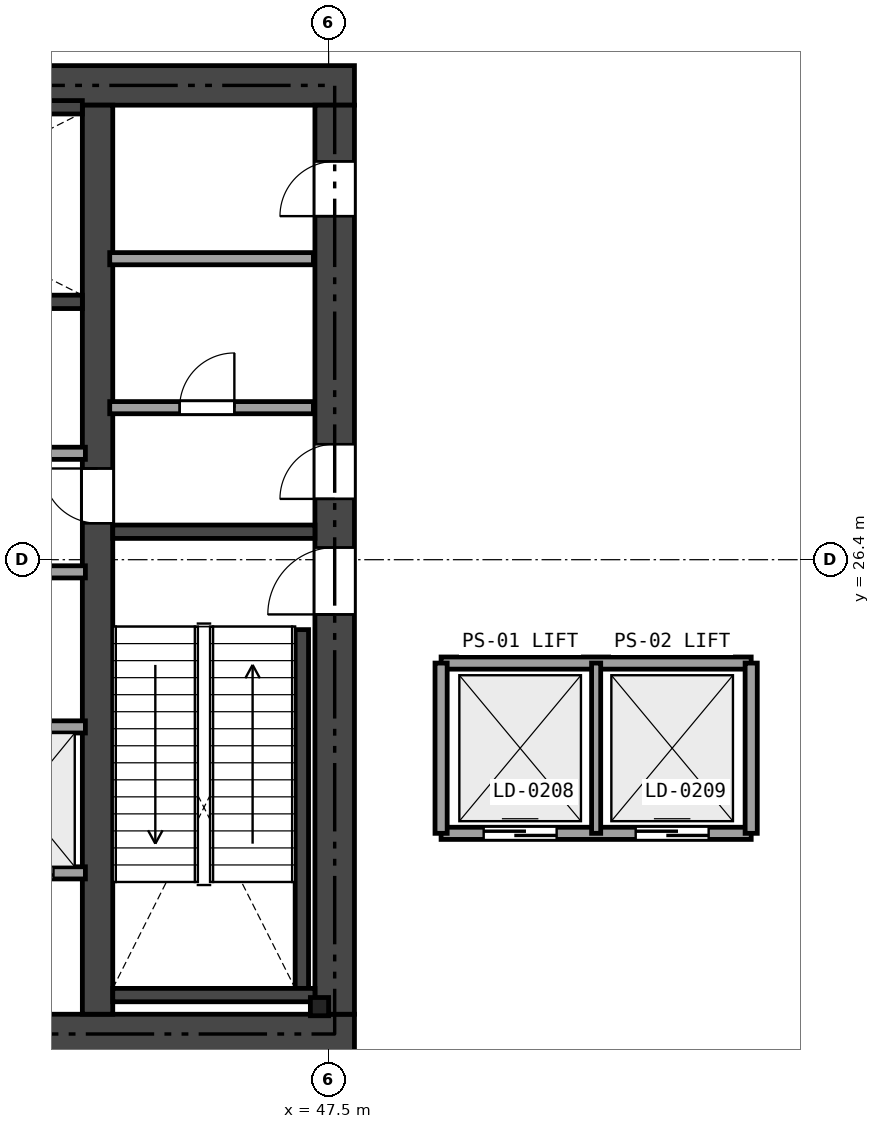
"""IFC4 building model, lengths in metres.
Left out: names, types, materials, properties, quantities, classifications, styles, units other than length and angle.
Written with IfcOpenShell. Run it as: python <this file> out.ifc"""

import sys

from ifc_helpers import new_model, si_unit, direction, frame, frame_2d, origin, origin_2d, place, context, subcontext, project, spatial, rectangle, i_section, extrude, element, fill, save


model = new_model("IFC4")
c1 = context("Model", 3, precision=1e-05, world=origin(), true_north=direction((0.0, 1.0)))
c2 = subcontext(c1, "Body", "Model", "MODEL_VIEW")
j1 = project(units=[si_unit("LENGTHUNIT", "METRE"), si_unit("PLANEANGLEUNIT", "RADIAN")], contexts=[c1])
p1 = place(None, origin())
s1 = spatial("IfcSite", under=j1, at=p1, CompositionType="ELEMENT")
p2 = place(p1, origin())
s2 = spatial("IfcBuilding", under=s1, at=p2, CompositionType="ELEMENT")
p3 = place(p2, frame((0.0, 0.0, 10.8)))
s3 = spatial("IfcBuildingStorey", under=s2, at=p3, CompositionType="ELEMENT", Elevation=10.8)
p4 = place(p3, frame((26.475, 18.6, 0.0), z_axis=(0.0, 0.0, 1.0), x_axis=(1.0, 0.0, 0.0)))
e1 = element("IfcWall", 1, at=p4, inside=s3, PredefinedType="SHEAR", context=c2, shape_type="SweptSolid", body=[
    extrude(rectangle(XDim=21.45, YDim=0.65, at=frame_2d((10.725, 0.0))), origin(), (0.0, 0.0, 1.0), 5.05),
])
p5 = place(p4, frame((12.45, 0.0, 0.0)))
e2 = element("IfcOpeningElement", 2, at=p5, cuts=e1, PredefinedType="OPENING", context=c2, shape_type="SweptSolid", body=[
    extrude(rectangle(XDim=1.15, YDim=2.15, at=frame_2d((0.575, 1.075))), frame((0.0, 0.335, 0.0), z_axis=(0.0, -1.0, 0.0), x_axis=(1.0, 0.0, 0.0)), (0.0, 0.0, 1.0), 0.67),
])
p6 = place(p4, frame((5.275, 0.0, 0.0)))
e3 = element("IfcOpeningElement", 3, at=p6, cuts=e1, PredefinedType="OPENING", context=c2, shape_type="SweptSolid", body=[
    extrude(rectangle(XDim=0.9, YDim=2.1, at=frame_2d((0.45, 1.05))), frame((0.0, 0.335, 0.0), z_axis=(0.0, -1.0, 0.0), x_axis=(1.0, 0.0, 0.0)), (0.0, 0.0, 1.0), 0.67),
])
p7 = place(p3, frame((26.475, 34.2, 0.0), z_axis=(0.0, 0.0, 1.0), x_axis=(1.0, 0.0, 0.0)))
e4 = element("IfcWall", 4, at=p7, inside=s3, PredefinedType="SHEAR", context=c2, shape_type="SweptSolid", body=[
    extrude(rectangle(XDim=21.45, YDim=0.65, at=frame_2d((10.725, 0.0))), origin(), (0.0, 0.0, 1.0), 5.05),
])
p8 = place(p7, frame((9.725, 0.0, 0.0)))
e5 = element("IfcOpeningElement", 5, at=p8, cuts=e4, PredefinedType="OPENING", context=c2, shape_type="SweptSolid", body=[
    extrude(rectangle(XDim=1.1, YDim=2.15, at=frame_2d((0.55, 1.075))), frame((0.0, 0.335, 0.0), z_axis=(0.0, -1.0, 0.0), x_axis=(1.0, 0.0, 0.0)), (0.0, 0.0, 1.0), 0.67),
])
p9 = place(p7, frame((1.975, 0.0, 0.0)))
e6 = element("IfcOpeningElement", 6, at=p9, cuts=e4, PredefinedType="OPENING", context=c2, shape_type="SweptSolid", body=[
    extrude(rectangle(XDim=0.9, YDim=2.1, at=frame_2d((0.45, 1.05))), frame((0.0, 0.335, 0.0), z_axis=(0.0, -1.0, 0.0), x_axis=(1.0, 0.0, 0.0)), (0.0, 0.0, 1.0), 0.67),
])
p10 = place(p7, frame((6.275, 0.0, 0.0)))
e7 = element("IfcOpeningElement", 7, at=p10, cuts=e4, PredefinedType="OPENING", context=c2, shape_type="SweptSolid", body=[
    extrude(rectangle(XDim=0.9, YDim=2.1, at=frame_2d((0.45, 1.05))), frame((0.0, 0.335, 0.0), z_axis=(0.0, -1.0, 0.0), x_axis=(1.0, 0.0, 0.0)), (0.0, 0.0, 1.0), 0.67),
])
p11 = place(p3, frame((47.6, 18.925, 0.0), z_axis=(0.0, 0.0, 1.0), x_axis=(0.0, 1.0, 0.0)))
e8 = element("IfcWall", 8, at=p11, inside=s3, PredefinedType="SHEAR", context=c2, shape_type="SweptSolid", body=[
    extrude(rectangle(XDim=14.95, YDim=0.65, at=frame_2d((7.475, 0.0))), origin(), (0.0, 0.0, 1.0), 5.05),
])
p12 = place(p11, frame((6.575, 0.0, 0.0)))
e9 = element("IfcOpeningElement", 9, at=p12, cuts=e8, PredefinedType="OPENING", context=c2, shape_type="SweptSolid", body=[
    extrude(rectangle(XDim=1.1, YDim=2.15, at=frame_2d((0.55, 1.075))), frame((0.0, 0.335, 0.0), z_axis=(0.0, -1.0, 0.0), x_axis=(1.0, 0.0, 0.0)), (0.0, 0.0, 1.0), 0.67),
])
p13 = place(p11, frame((8.475, 0.0, 0.0)))
e10 = element("IfcOpeningElement", 10, at=p13, cuts=e8, PredefinedType="OPENING", context=c2, shape_type="SweptSolid", body=[
    extrude(rectangle(XDim=0.9, YDim=2.1, at=frame_2d((0.45, 1.05))), frame((0.0, 0.335, 0.0), z_axis=(0.0, -1.0, 0.0), x_axis=(1.0, 0.0, 0.0)), (0.0, 0.0, 1.0), 0.67),
])
p14 = place(p11, frame((13.125, 0.0, 0.0)))
e11 = element("IfcOpeningElement", 11, at=p14, cuts=e8, PredefinedType="OPENING", context=c2, shape_type="SweptSolid", body=[
    extrude(rectangle(XDim=0.9, YDim=2.1, at=frame_2d((0.45, 1.05))), frame((0.0, 0.335, 0.0), z_axis=(0.0, -1.0, 0.0), x_axis=(1.0, 0.0, 0.0)), (0.0, 0.0, 1.0), 0.67),
])
p15 = place(p3, frame((43.7, 18.925, 0.0), z_axis=(0.0, 0.0, 1.0), x_axis=(0.0, 1.0, 0.0)))
e12 = element("IfcWall", 12, at=p15, inside=s3, PredefinedType="SHEAR", context=c2, shape_type="SweptSolid", body=[
    extrude(rectangle(XDim=14.95, YDim=0.5, at=frame_2d((7.475, 0.0))), origin(), (0.0, 0.0, 1.0), 5.05),
])
p16 = place(p15, frame((8.075, 0.0, 0.0)))
e13 = element("IfcOpeningElement", 13, at=p16, cuts=e12, PredefinedType="OPENING", context=c2, shape_type="SweptSolid", body=[
    extrude(rectangle(XDim=0.9, YDim=2.1, at=frame_2d((0.45, 1.05))), frame((0.0, 0.26, 0.0), z_axis=(0.0, -1.0, 0.0), x_axis=(1.0, 0.0, 0.0)), (0.0, 0.0, 1.0), 0.52),
])
p17 = place(p3, frame((43.95, 26.86, 0.0), z_axis=(0.0, 0.0, 1.0), x_axis=(1.0, 0.0, 0.0)))
e14 = element("IfcWall", 14, at=p17, inside=s3, PredefinedType="SHEAR", context=c2, shape_type="SweptSolid", body=[
    extrude(rectangle(XDim=3.325, YDim=0.22, at=frame_2d((1.663, 0.0))), origin(), (0.0, 0.0, 1.0), 5.05),
])
p18 = place(p3, frame((47.06, 19.35, 0.0), z_axis=(0.0, 0.0, 1.0), x_axis=(0.0, 1.0, 0.0)))
e15 = element("IfcWall", 15, at=p18, inside=s3, PredefinedType="SHEAR", context=c2, shape_type="SweptSolid", body=[
    extrude(rectangle(XDim=5.9, YDim=0.22, at=frame_2d((2.95, 0.0))), origin(), (0.0, 0.0, 1.0), 5.05),
])
p19 = place(p3, frame((43.95, 19.24, 0.0), z_axis=(0.0, 0.0, 1.0), x_axis=(1.0, 0.0, 0.0)))
e16 = element("IfcWall", 16, at=p19, inside=s3, PredefinedType="SHEAR", context=c2, shape_type="SweptSolid", body=[
    extrude(rectangle(XDim=3.325, YDim=0.22, at=frame_2d((1.663, 0.0))), origin(), (0.0, 0.0, 1.0), 5.05),
])
p20 = place(p3, frame((35.84, 30.64, 0.0), z_axis=(0.0, 0.0, 1.0), x_axis=(1.0, 0.0, 0.0)))
e17 = element("IfcWall", 17, at=p20, inside=s3, PredefinedType="SHEAR", context=c2, shape_type="SweptSolid", body=[
    extrude(rectangle(XDim=7.61, YDim=0.22, at=frame_2d((3.805, 0.0))), origin(), (0.0, 0.0, 1.0), 5.05),
])
p21 = place(p3, frame((37.55, 33.84, 0.0), z_axis=(0.0, 0.0, 1.0), x_axis=(1.0, 0.0, 0.0)))
e18 = element("IfcWall", 18, at=p21, inside=s3, PredefinedType="SHEAR", context=c2, shape_type="SweptSolid", body=[
    extrude(rectangle(XDim=5.9, YDim=0.22, at=frame_2d((2.95, 0.0))), origin(), (0.0, 0.0, 1.0), 5.05),
])
p22 = place(p3, frame((47.35, 19.05, 0.0), z_axis=(0.0, 0.0, 1.0), x_axis=(1.0, 0.0, 0.0)))
e19 = element("IfcColumn", 19, at=p22, inside=s3, PredefinedType="PILASTER", context=c2, shape_type="SweptSolid", body=[
    extrude(i_section(OverallWidth=0.3, OverallDepth=0.3, WebThickness=0.011, FlangeThickness=0.019, at=origin_2d()), origin(), (0.0, 0.0, 1.0), 5.05),
])
p23 = place(p3, frame((43.9, 28.9, 0.0), z_axis=(0.0, 0.0, 1.0), x_axis=(1.0, 0.0, 0.0)))
e20 = element("IfcWall", 20, at=p23, inside=s3, PredefinedType="SOLIDWALL", context=c2, shape_type="SweptSolid", body=[
    extrude(rectangle(XDim=3.35, YDim=0.2, at=frame_2d((1.675, 0.0))), origin(), (0.0, 0.0, 1.0), 5.05),
])
p24 = place(p23, frame((1.15, 0.0, 0.0)))
e21 = element("IfcOpeningElement", 21, at=p24, cuts=e20, PredefinedType="OPENING", context=c2, shape_type="SweptSolid", body=[
    extrude(rectangle(XDim=0.9, YDim=2.1, at=frame_2d((0.45, 1.05))), frame((0.0, 0.11, 0.0), z_axis=(0.0, -1.0, 0.0), x_axis=(1.0, 0.0, 0.0)), (0.0, 0.0, 1.0), 0.22),
])
p25 = place(p3, frame((43.9, 31.35, 0.0), z_axis=(0.0, 0.0, 1.0), x_axis=(1.0, 0.0, 0.0)))
e22 = element("IfcWall", 22, at=p25, inside=s3, PredefinedType="SOLIDWALL", context=c2, shape_type="SweptSolid", body=[
    extrude(rectangle(XDim=3.35, YDim=0.2, at=frame_2d((1.675, 0.0))), origin(), (0.0, 0.0, 1.0), 5.05),
])
for number, where, z_axis, x_axis in (
    (23, (35.62, 28.15, 0.0), (0.0, 0.0, 1.0), (1.0, 0.0, 0.0)),
    (24, (35.62, 26.2, 0.0), (0.0, 0.0, 1.0), (1.0, 0.0, 0.0)),
):
    element("IfcWall", number, at=place(p3, frame(where, z_axis=z_axis, x_axis=x_axis)), inside=s3, PredefinedType="SOLIDWALL", context=c2, shape_type="SweptSolid", body=[
        extrude(rectangle(XDim=7.88, YDim=0.2, at=frame_2d((3.94, 0.0))), origin(), (0.0, 0.0, 1.0), 5.05),
    ])
p26 = place(p3, frame((35.62, 23.65, 0.0), z_axis=(0.0, 0.0, 1.0), x_axis=(1.0, 0.0, 0.0)))
e25 = element("IfcWall", 25, at=p26, inside=s3, PredefinedType="SOLIDWALL", context=c2, shape_type="SweptSolid", body=[
    extrude(rectangle(XDim=7.88, YDim=0.2, at=frame_2d((3.94, 0.0))), origin(), (0.0, 0.0, 1.0), 4.571),
])
p27 = place(p3, frame((35.62, 21.25, 0.0), z_axis=(0.0, 0.0, 1.0), x_axis=(1.0, 0.0, 0.0)))
e26 = element("IfcWall", 26, at=p27, inside=s3, PredefinedType="SOLIDWALL", context=c2, shape_type="SweptSolid", body=[
    extrude(rectangle(XDim=7.88, YDim=0.2, at=frame_2d((3.94, 0.0))), origin(), (0.0, 0.0, 1.0), 5.05),
])
p28 = place(p27, frame((0.405, 0.0, 0.0)))
e27 = element("IfcOpeningElement", 27, at=p28, cuts=e26, PredefinedType="OPENING", context=c2, shape_type="SweptSolid", body=[
    extrude(rectangle(XDim=1.1, YDim=2.15, at=frame_2d((0.55, 1.075))), frame((0.0, 0.11, 0.0), z_axis=(0.0, -1.0, 0.0), x_axis=(1.0, 0.0, 0.0)), (0.0, 0.0, 1.0), 0.22),
])
p29 = place(p27, frame((2.355, 0.0, 0.0)))
e28 = element("IfcOpeningElement", 28, at=p29, cuts=e26, PredefinedType="OPENING", context=c2, shape_type="SweptSolid", body=[
    extrude(rectangle(XDim=1.1, YDim=2.15, at=frame_2d((0.55, 1.075))), frame((0.0, 0.11, 0.0), z_axis=(0.0, -1.0, 0.0), x_axis=(1.0, 0.0, 0.0)), (0.0, 0.0, 1.0), 0.22),
])
p30 = place(p27, frame((4.305, 0.0, 0.0)))
e29 = element("IfcOpeningElement", 29, at=p30, cuts=e26, PredefinedType="OPENING", context=c2, shape_type="SweptSolid", body=[
    extrude(rectangle(XDim=1.1, YDim=2.15, at=frame_2d((0.55, 1.075))), frame((0.0, 0.11, 0.0), z_axis=(0.0, -1.0, 0.0), x_axis=(1.0, 0.0, 0.0)), (0.0, 0.0, 1.0), 0.22),
])
p31 = place(p27, frame((6.255, 0.0, 0.0)))
e30 = element("IfcOpeningElement", 30, at=p31, cuts=e26, PredefinedType="OPENING", context=c2, shape_type="SweptSolid", body=[
    extrude(rectangle(XDim=1.1, YDim=2.15, at=frame_2d((0.55, 1.075))), frame((0.0, 0.11, 0.0), z_axis=(0.0, -1.0, 0.0), x_axis=(1.0, 0.0, 0.0)), (0.0, 0.0, 1.0), 0.22),
])
p32 = place(p3, frame((49.35, 24.7, 0.0), z_axis=(0.0, 0.0, 1.0), x_axis=(1.0, 0.0, 0.0)))
e31 = element("IfcWall", 31, at=p32, inside=s3, PredefinedType="SOLIDWALL", context=c2, shape_type="SweptSolid", body=[
    extrude(rectangle(XDim=5.1, YDim=0.2, at=frame_2d((2.55, 0.0))), origin(), (0.0, 0.0, 1.0), 5.05),
])
p33 = place(p3, frame((49.35, 21.9, 0.0), z_axis=(0.0, 0.0, 1.0), x_axis=(1.0, 0.0, 0.0)))
e32 = element("IfcWall", 32, at=p33, inside=s3, PredefinedType="SOLIDWALL", context=c2, shape_type="SweptSolid", body=[
    extrude(rectangle(XDim=5.1, YDim=0.2, at=frame_2d((2.55, 0.0))), origin(), (0.0, 0.0, 1.0), 5.05),
])
p34 = place(p33, frame((0.7, 0.0, 0.0)))
e33 = element("IfcOpeningElement", 33, at=p34, cuts=e32, PredefinedType="OPENING", context=c2, shape_type="SweptSolid", body=[
    extrude(rectangle(XDim=1.2, YDim=2.15, at=frame_2d((0.6, 1.075))), frame((0.0, 0.11, 0.0), z_axis=(0.0, -1.0, 0.0), x_axis=(1.0, 0.0, 0.0)), (0.0, 0.0, 1.0), 0.22),
])
p35 = place(p33, frame((3.2, 0.0, 0.0)))
e34 = element("IfcOpeningElement", 34, at=p35, cuts=e32, PredefinedType="OPENING", context=c2, shape_type="SweptSolid", body=[
    extrude(rectangle(XDim=1.2, YDim=2.15, at=frame_2d((0.6, 1.075))), frame((0.0, 0.11, 0.0), z_axis=(0.0, -1.0, 0.0), x_axis=(1.0, 0.0, 0.0)), (0.0, 0.0, 1.0), 0.22),
])
for number, where, z_axis, x_axis in (
    (35, (49.35, 21.9, 0.0), (0.0, 0.0, 1.0), (0.0, 1.0, 0.0)),
    (36, (54.45, 21.9, 0.0), (0.0, 0.0, 1.0), (0.0, 1.0, 0.0)),
):
    element("IfcWall", number, at=place(p3, frame(where, z_axis=z_axis, x_axis=x_axis)), inside=s3, PredefinedType="SOLIDWALL", context=c2, shape_type="SweptSolid", body=[
        extrude(rectangle(XDim=2.8, YDim=0.2, at=frame_2d((1.4, 0.0))), origin(), (0.0, 0.0, 1.0), 5.05),
    ])
p36 = place(p3, frame((51.9, 21.9, 0.0), z_axis=(0.0, 0.0, 1.0), x_axis=(0.0, 1.0, 0.0)))
e37 = element("IfcWall", 37, at=p36, inside=s3, PredefinedType="PARTITIONING", context=c2, shape_type="SweptSolid", body=[
    extrude(rectangle(XDim=2.8, YDim=0.15, at=frame_2d((1.4, 0.0))), origin(), (0.0, 0.0, 1.0), 5.05),
])
p37 = place(p12, origin())
e38 = element("IfcDoor", 38, at=p37, inside=s3, OperationType="SINGLE_SWING_LEFT", PredefinedType="DOOR", context=c2, shape_type="SweptSolid", body=[
    extrude(rectangle(XDim=1.1, YDim=2.15, at=frame_2d((0.55, 1.075))), frame((0.0, 0.025, 0.0), z_axis=(0.0, -1.0, 0.0), x_axis=(1.0, 0.0, 0.0)), (0.0, 0.0, 1.0), 0.05),
])
fill(e9, e38)
p38 = place(p16, origin())
e39 = element("IfcDoor", 39, at=p38, inside=s3, OperationType="SINGLE_SWING_RIGHT", PredefinedType="DOOR", context=c2, shape_type="SweptSolid", body=[
    extrude(rectangle(XDim=0.9, YDim=2.1, at=frame_2d((0.45, 1.05))), frame((0.0, 0.025, 0.0), z_axis=(0.0, -1.0, 0.0), x_axis=(1.0, 0.0, 0.0)), (0.0, 0.0, 1.0), 0.05),
])
fill(e13, e39)
p39 = place(p13, origin())
e40 = element("IfcDoor", 40, at=p39, inside=s3, OperationType="SINGLE_SWING_LEFT", PredefinedType="DOOR", context=c2, shape_type="SweptSolid", body=[
    extrude(rectangle(XDim=0.9, YDim=2.1, at=frame_2d((0.45, 1.05))), frame((0.0, 0.025, 0.0), z_axis=(0.0, -1.0, 0.0), x_axis=(1.0, 0.0, 0.0)), (0.0, 0.0, 1.0), 0.05),
])
fill(e10, e40)
p40 = place(p24, origin())
e41 = element("IfcDoor", 41, at=p40, inside=s3, OperationType="SINGLE_SWING_RIGHT", PredefinedType="DOOR", context=c2, shape_type="SweptSolid", body=[
    extrude(rectangle(XDim=0.9, YDim=2.1, at=frame_2d((0.45, 1.05))), frame((0.0, 0.025, 0.0), z_axis=(0.0, -1.0, 0.0), x_axis=(1.0, 0.0, 0.0)), (0.0, 0.0, 1.0), 0.05),
])
fill(e21, e41)
p41 = place(p14, origin())
e42 = element("IfcDoor", 42, at=p41, inside=s3, OperationType="SINGLE_SWING_LEFT", PredefinedType="DOOR", context=c2, shape_type="SweptSolid", body=[
    extrude(rectangle(XDim=0.9, YDim=2.1, at=frame_2d((0.45, 1.05))), frame((0.0, 0.025, 0.0), z_axis=(0.0, -1.0, 0.0), x_axis=(1.0, 0.0, 0.0)), (0.0, 0.0, 1.0), 0.05),
])
fill(e11, e42)
p42 = place(p31, origin())
e43 = element("IfcDoor", 43, at=p42, inside=s3, OperationType="SLIDING_TO_LEFT", PredefinedType="DOOR", context=c2, shape_type="SweptSolid", body=[
    extrude(rectangle(XDim=1.1, YDim=2.15, at=frame_2d((0.55, 1.075))), frame((0.0, 0.025, 0.0), z_axis=(0.0, -1.0, 0.0), x_axis=(1.0, 0.0, 0.0)), (0.0, 0.0, 1.0), 0.05),
])
fill(e30, e43)
p43 = place(p34, origin())
e44 = element("IfcDoor", 44, at=p43, inside=s3, OperationType="SLIDING_TO_LEFT", PredefinedType="DOOR", context=c2, shape_type="SweptSolid", body=[
    extrude(rectangle(XDim=1.2, YDim=2.15, at=frame_2d((0.6, 1.075))), frame((0.0, 0.025, 0.0), z_axis=(0.0, -1.0, 0.0), x_axis=(1.0, 0.0, 0.0)), (0.0, 0.0, 1.0), 0.05),
])
fill(e33, e44)
p44 = place(p35, origin())
e45 = element("IfcDoor", 45, at=p44, inside=s3, OperationType="SLIDING_TO_LEFT", PredefinedType="DOOR", context=c2, shape_type="SweptSolid", body=[
    extrude(rectangle(XDim=1.2, YDim=2.15, at=frame_2d((0.6, 1.075))), frame((0.0, 0.025, 0.0), z_axis=(0.0, -1.0, 0.0), x_axis=(1.0, 0.0, 0.0)), (0.0, 0.0, 1.0), 0.05),
])
fill(e34, e45)
save(model, sys.argv[1])
